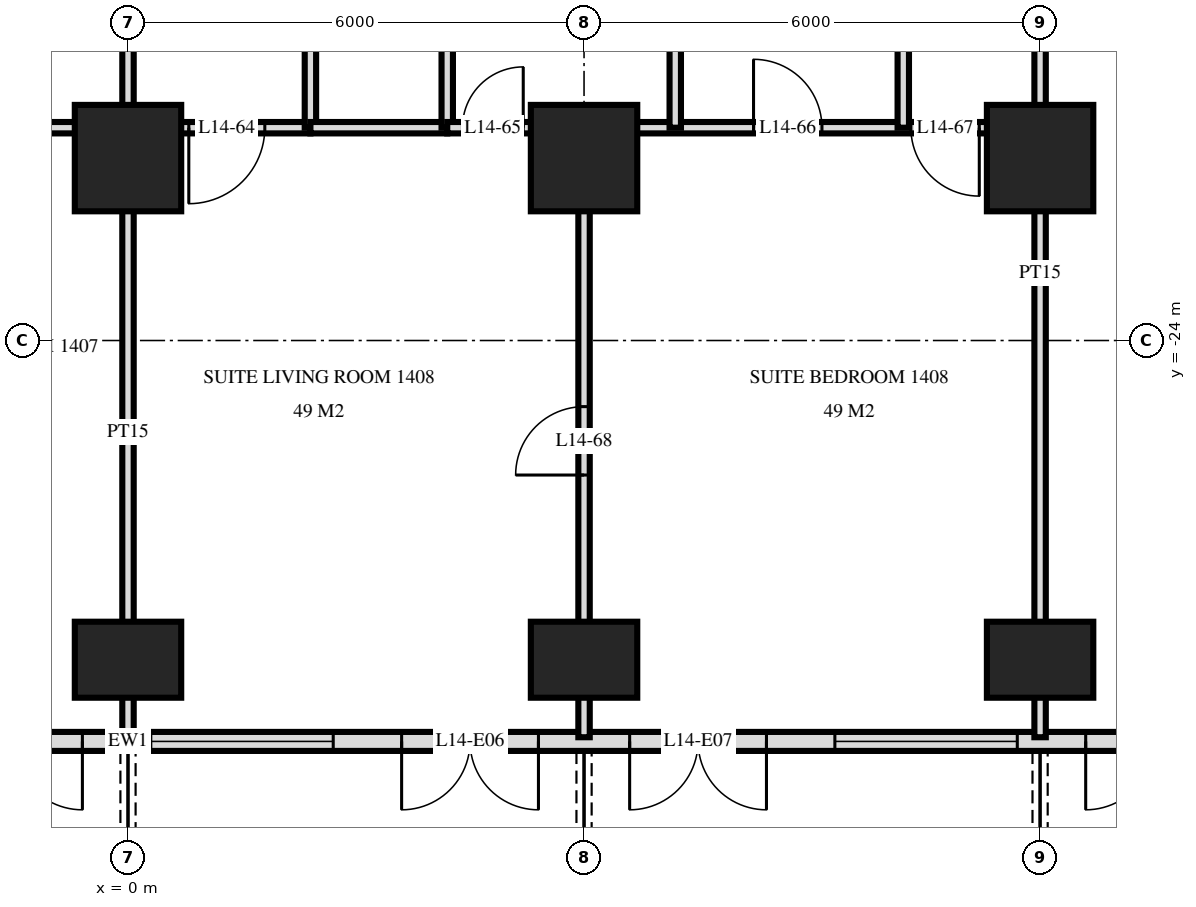
"""IFC4 building model, lengths in metres.
Left out: names, types, materials, properties, quantities, classifications, styles, units other than length and angle.
Written with IfcOpenShell. Run it as: python <this file> out.ifc"""

import sys

from ifc_helpers import new_model, si_unit, direction, frame, frame_2d, origin, origin_2d, place, context, subcontext, project, spatial, rectangle, extrude, element, fill, save


model = new_model("IFC4")
c1 = context("Model", 3, precision=1e-05, world=origin(), true_north=direction((0.0, 1.0)))
c2 = subcontext(c1, "Body", "Model", "MODEL_VIEW")
j1 = project(units=[si_unit("LENGTHUNIT", "METRE"), si_unit("PLANEANGLEUNIT", "RADIAN")], contexts=[c1])
p1 = place(None, origin())
s1 = spatial("IfcSite", under=j1, at=p1, CompositionType="ELEMENT")
p2 = place(p1, origin())
s2 = spatial("IfcBuilding", under=s1, at=p2, CompositionType="ELEMENT")
p3 = place(p2, frame((0.0, 0.0, 60.0)))
s3 = spatial("IfcBuildingStorey", under=s2, at=p3, CompositionType="ELEMENT", Elevation=60.0)
p4 = place(p3, frame((0.0, -28.2, 0.0), z_axis=(0.0, 0.0, 1.0), x_axis=(1.0, 0.0, 0.0)))
e1 = element("IfcColumn", 1, at=p4, inside=s3, PredefinedType="COLUMN", context=c2, shape_type="SweptSolid", body=[
    extrude(rectangle(XDim=1.4, YDim=1.0, at=origin_2d()), origin(), (0.0, 0.0, 1.0), 3.6),
])
p5 = place(p3, frame((0.0, -21.6, 0.0), z_axis=(0.0, 0.0, 1.0), x_axis=(1.0, 0.0, 0.0)))
e2 = element("IfcColumn", 2, at=p5, inside=s3, PredefinedType="COLUMN", context=c2, shape_type="SweptSolid", body=[
    extrude(rectangle(XDim=1.4, YDim=1.4, at=origin_2d()), origin(), (0.0, 0.0, 1.0), 3.6),
])
p6 = place(p3, frame((6.0, -28.2, 0.0), z_axis=(0.0, 0.0, 1.0), x_axis=(1.0, 0.0, 0.0)))
e3 = element("IfcColumn", 3, at=p6, inside=s3, PredefinedType="COLUMN", context=c2, shape_type="SweptSolid", body=[
    extrude(rectangle(XDim=1.4, YDim=1.0, at=origin_2d()), origin(), (0.0, 0.0, 1.0), 3.6),
])
p7 = place(p3, frame((6.0, -21.6, 0.0), z_axis=(0.0, 0.0, 1.0), x_axis=(1.0, 0.0, 0.0)))
e4 = element("IfcColumn", 4, at=p7, inside=s3, PredefinedType="COLUMN", context=c2, shape_type="SweptSolid", body=[
    extrude(rectangle(XDim=1.4, YDim=1.4, at=origin_2d()), origin(), (0.0, 0.0, 1.0), 3.6),
])
p8 = place(p3, frame((12.0, -28.2, 0.0), z_axis=(0.0, 0.0, 1.0), x_axis=(1.0, 0.0, 0.0)))
e5 = element("IfcColumn", 5, at=p8, inside=s3, PredefinedType="COLUMN", context=c2, shape_type="SweptSolid", body=[
    extrude(rectangle(XDim=1.4, YDim=1.0, at=origin_2d()), origin(), (0.0, 0.0, 1.0), 3.6),
])
p9 = place(p3, frame((12.0, -21.6, 0.0), z_axis=(0.0, 0.0, 1.0), x_axis=(1.0, 0.0, 0.0)))
e6 = element("IfcColumn", 6, at=p9, inside=s3, PredefinedType="COLUMN", context=c2, shape_type="SweptSolid", body=[
    extrude(rectangle(XDim=1.4, YDim=1.4, at=origin_2d()), origin(), (0.0, 0.0, 1.0), 3.6),
])
p10 = place(p3, frame((-28.775, -29.275, 0.0), z_axis=(0.0, 0.0, 1.0), x_axis=(1.0, 0.0, 0.0)))
e7 = element("IfcWall", 7, at=p10, inside=s3, PredefinedType="SOLIDWALL", context=c2, shape_type="SweptSolid", body=[
    extrude(rectangle(XDim=57.551, YDim=0.25, at=frame_2d((28.775, 0.0))), origin(), (0.0, 0.0, 1.0), 3.32),
])
p11 = place(p10, frame((0.575, 0.0, 0.0)))
e8 = element("IfcOpeningElement", 8, at=p11, cuts=e7, PredefinedType="OPENING", context=c2, shape_type="SweptSolid", body=[
    extrude(rectangle(XDim=1.8, YDim=2.4, at=frame_2d((0.9, 1.2))), frame((0.0, 0.135, 0.0), z_axis=(0.0, -1.0, 0.0), x_axis=(1.0, 0.0, 0.0)), (0.0, 0.0, 1.0), 0.27),
])
p12 = place(p10, frame((5.375, 0.0, 0.0)))
e9 = element("IfcOpeningElement", 9, at=p12, cuts=e7, PredefinedType="OPENING", context=c2, shape_type="SweptSolid", body=[
    extrude(rectangle(XDim=1.8, YDim=2.4, at=frame_2d((0.9, 1.2))), frame((0.0, 0.135, 0.0), z_axis=(0.0, -1.0, 0.0), x_axis=(1.0, 0.0, 0.0)), (0.0, 0.0, 1.0), 0.27),
])
p13 = place(p10, frame((8.075, 0.0, 0.3)))
e10 = element("IfcOpeningElement", 10, at=p13, cuts=e7, PredefinedType="OPENING", context=c2, shape_type="SweptSolid", body=[
    extrude(rectangle(XDim=2.4, YDim=2.1, at=frame_2d((1.2, 1.05))), frame((0.0, 0.135, 0.0), z_axis=(0.0, -1.0, 0.0), x_axis=(1.0, 0.0, 0.0)), (0.0, 0.0, 1.0), 0.27),
])
p14 = place(p10, frame((11.375, 0.0, 0.0)))
e11 = element("IfcOpeningElement", 11, at=p14, cuts=e7, PredefinedType="OPENING", context=c2, shape_type="SweptSolid", body=[
    extrude(rectangle(XDim=1.8, YDim=2.4, at=frame_2d((0.9, 1.2))), frame((0.0, 0.135, 0.0), z_axis=(0.0, -1.0, 0.0), x_axis=(1.0, 0.0, 0.0)), (0.0, 0.0, 1.0), 0.27),
])
p15 = place(p10, frame((14.075, 0.0, 0.3)))
e12 = element("IfcOpeningElement", 12, at=p15, cuts=e7, PredefinedType="OPENING", context=c2, shape_type="SweptSolid", body=[
    extrude(rectangle(XDim=2.4, YDim=2.1, at=frame_2d((1.2, 1.05))), frame((0.0, 0.135, 0.0), z_axis=(0.0, -1.0, 0.0), x_axis=(1.0, 0.0, 0.0)), (0.0, 0.0, 1.0), 0.27),
])
p16 = place(p10, frame((17.375, 0.0, 0.0)))
e13 = element("IfcOpeningElement", 13, at=p16, cuts=e7, PredefinedType="OPENING", context=c2, shape_type="SweptSolid", body=[
    extrude(rectangle(XDim=1.8, YDim=2.4, at=frame_2d((0.9, 1.2))), frame((0.0, 0.135, 0.0), z_axis=(0.0, -1.0, 0.0), x_axis=(1.0, 0.0, 0.0)), (0.0, 0.0, 1.0), 0.27),
])
p17 = place(p10, frame((20.075, 0.0, 0.3)))
e14 = element("IfcOpeningElement", 14, at=p17, cuts=e7, PredefinedType="OPENING", context=c2, shape_type="SweptSolid", body=[
    extrude(rectangle(XDim=2.4, YDim=2.1, at=frame_2d((1.2, 1.05))), frame((0.0, 0.135, 0.0), z_axis=(0.0, -1.0, 0.0), x_axis=(1.0, 0.0, 0.0)), (0.0, 0.0, 1.0), 0.27),
])
p18 = place(p10, frame((23.075, 0.0, 0.3)))
e15 = element("IfcOpeningElement", 15, at=p18, cuts=e7, PredefinedType="OPENING", context=c2, shape_type="SweptSolid", body=[
    extrude(rectangle(XDim=2.4, YDim=2.1, at=frame_2d((1.2, 1.05))), frame((0.0, 0.135, 0.0), z_axis=(0.0, -1.0, 0.0), x_axis=(1.0, 0.0, 0.0)), (0.0, 0.0, 1.0), 0.27),
])
p19 = place(p10, frame((26.375, 0.0, 0.0)))
e16 = element("IfcOpeningElement", 16, at=p19, cuts=e7, PredefinedType="OPENING", context=c2, shape_type="SweptSolid", body=[
    extrude(rectangle(XDim=1.8, YDim=2.4, at=frame_2d((0.9, 1.2))), frame((0.0, 0.135, 0.0), z_axis=(0.0, -1.0, 0.0), x_axis=(1.0, 0.0, 0.0)), (0.0, 0.0, 1.0), 0.27),
])
p20 = place(p10, frame((29.075, 0.0, 0.3)))
e17 = element("IfcOpeningElement", 17, at=p20, cuts=e7, PredefinedType="OPENING", context=c2, shape_type="SweptSolid", body=[
    extrude(rectangle(XDim=2.4, YDim=2.1, at=frame_2d((1.2, 1.05))), frame((0.0, 0.135, 0.0), z_axis=(0.0, -1.0, 0.0), x_axis=(1.0, 0.0, 0.0)), (0.0, 0.0, 1.0), 0.27),
])
p21 = place(p10, frame((32.375, 0.0, 0.0)))
e18 = element("IfcOpeningElement", 18, at=p21, cuts=e7, PredefinedType="OPENING", context=c2, shape_type="SweptSolid", body=[
    extrude(rectangle(XDim=1.8, YDim=2.4, at=frame_2d((0.9, 1.2))), frame((0.0, 0.135, 0.0), z_axis=(0.0, -1.0, 0.0), x_axis=(1.0, 0.0, 0.0)), (0.0, 0.0, 1.0), 0.27),
])
p22 = place(p10, frame((35.375, 0.0, 0.0)))
e19 = element("IfcOpeningElement", 19, at=p22, cuts=e7, PredefinedType="OPENING", context=c2, shape_type="SweptSolid", body=[
    extrude(rectangle(XDim=1.8, YDim=2.4, at=frame_2d((0.9, 1.2))), frame((0.0, 0.135, 0.0), z_axis=(0.0, -1.0, 0.0), x_axis=(1.0, 0.0, 0.0)), (0.0, 0.0, 1.0), 0.27),
])
p23 = place(p10, frame((38.075, 0.0, 0.3)))
e20 = element("IfcOpeningElement", 20, at=p23, cuts=e7, PredefinedType="OPENING", context=c2, shape_type="SweptSolid", body=[
    extrude(rectangle(XDim=2.4, YDim=2.1, at=frame_2d((1.2, 1.05))), frame((0.0, 0.135, 0.0), z_axis=(0.0, -1.0, 0.0), x_axis=(1.0, 0.0, 0.0)), (0.0, 0.0, 1.0), 0.27),
])
p24 = place(p10, frame((41.375, 0.0, 0.0)))
e21 = element("IfcOpeningElement", 21, at=p24, cuts=e7, PredefinedType="OPENING", context=c2, shape_type="SweptSolid", body=[
    extrude(rectangle(XDim=1.8, YDim=2.4, at=frame_2d((0.9, 1.2))), frame((0.0, 0.135, 0.0), z_axis=(0.0, -1.0, 0.0), x_axis=(1.0, 0.0, 0.0)), (0.0, 0.0, 1.0), 0.27),
])
p25 = place(p10, frame((44.075, 0.0, 0.3)))
e22 = element("IfcOpeningElement", 22, at=p25, cuts=e7, PredefinedType="OPENING", context=c2, shape_type="SweptSolid", body=[
    extrude(rectangle(XDim=2.4, YDim=2.1, at=frame_2d((1.2, 1.05))), frame((0.0, 0.135, 0.0), z_axis=(0.0, -1.0, 0.0), x_axis=(1.0, 0.0, 0.0)), (0.0, 0.0, 1.0), 0.27),
])
p26 = place(p10, frame((47.075, 0.0, 0.3)))
e23 = element("IfcOpeningElement", 23, at=p26, cuts=e7, PredefinedType="OPENING", context=c2, shape_type="SweptSolid", body=[
    extrude(rectangle(XDim=2.4, YDim=2.1, at=frame_2d((1.2, 1.05))), frame((0.0, 0.135, 0.0), z_axis=(0.0, -1.0, 0.0), x_axis=(1.0, 0.0, 0.0)), (0.0, 0.0, 1.0), 0.27),
])
p27 = place(p10, frame((50.375, 0.0, 0.0)))
e24 = element("IfcOpeningElement", 24, at=p27, cuts=e7, PredefinedType="OPENING", context=c2, shape_type="SweptSolid", body=[
    extrude(rectangle(XDim=1.8, YDim=2.4, at=frame_2d((0.9, 1.2))), frame((0.0, 0.135, 0.0), z_axis=(0.0, -1.0, 0.0), x_axis=(1.0, 0.0, 0.0)), (0.0, 0.0, 1.0), 0.27),
])
p28 = place(p10, frame((53.375, 0.0, 0.0)))
e25 = element("IfcOpeningElement", 25, at=p28, cuts=e7, PredefinedType="OPENING", context=c2, shape_type="SweptSolid", body=[
    extrude(rectangle(XDim=1.8, YDim=2.4, at=frame_2d((0.9, 1.2))), frame((0.0, 0.135, 0.0), z_axis=(0.0, -1.0, 0.0), x_axis=(1.0, 0.0, 0.0)), (0.0, 0.0, 1.0), 0.27),
])
p29 = place(p3, frame((12.0, -29.22, 0.0), z_axis=(0.0, 0.0, 1.0), x_axis=(0.0, 1.0, 0.0)))
e26 = element("IfcWall", 26, at=p29, inside=s3, PredefinedType="PARTITIONING", context=c2, shape_type="SweptSolid", body=[
    extrude(rectangle(XDim=12.22, YDim=0.15, at=frame_2d((6.11, 0.0))), origin(), (0.0, 0.0, 1.0), 3.32),
])
for number, where, z_axis, x_axis in (
    (27, (10.2, -21.2, 0.0), (0.0, 0.0, 1.0), (0.0, 1.0, 0.0)),
    (28, (7.2, -21.2, 0.0), (0.0, 0.0, 1.0), (0.0, 1.0, 0.0)),
):
    element("IfcWall", number, at=place(p3, frame(where, z_axis=z_axis, x_axis=x_axis)), inside=s3, PredefinedType="PARTITIONING", context=c2, shape_type="SweptSolid", body=[
        extrude(rectangle(XDim=4.2, YDim=0.15, at=frame_2d((2.1, 0.0))), origin(), (0.0, 0.0, 1.0), 3.32),
    ])
p30 = place(p3, frame((6.0, -29.22, 0.0), z_axis=(0.0, 0.0, 1.0), x_axis=(0.0, 1.0, 0.0)))
e29 = element("IfcWall", 29, at=p30, inside=s3, PredefinedType="PARTITIONING", context=c2, shape_type="SweptSolid", body=[
    extrude(rectangle(XDim=8.02, YDim=0.15, at=frame_2d((4.01, 0.0))), origin(), (0.0, 0.0, 1.0), 3.32),
])
p31 = place(p30, frame((3.45, 0.0, 0.0)))
e30 = element("IfcOpeningElement", 30, at=p31, cuts=e29, PredefinedType="OPENING", context=c2, shape_type="SweptSolid", body=[
    extrude(rectangle(XDim=0.9, YDim=2.1, at=frame_2d((0.45, 1.05))), frame((0.0, 0.085, 0.0), z_axis=(0.0, -1.0, 0.0), x_axis=(1.0, 0.0, 0.0)), (0.0, 0.0, 1.0), 0.17),
])
p32 = place(p3, frame((4.2, -21.2, 0.0), z_axis=(0.0, 0.0, 1.0), x_axis=(0.0, 1.0, 0.0)))
e31 = element("IfcWall", 31, at=p32, inside=s3, PredefinedType="PLUMBINGWALL", context=c2, shape_type="SweptSolid", body=[
    extrude(rectangle(XDim=4.2, YDim=0.15, at=frame_2d((2.1, 0.0))), origin(), (0.0, 0.0, 1.0), 3.32),
])
p33 = place(p3, frame((2.4, -21.2, 0.0), z_axis=(0.0, 0.0, 1.0), x_axis=(0.0, 1.0, 0.0)))
e32 = element("IfcWall", 32, at=p33, inside=s3, PredefinedType="PARTITIONING", context=c2, shape_type="SweptSolid", body=[
    extrude(rectangle(XDim=4.2, YDim=0.15, at=frame_2d((2.1, 0.0))), origin(), (0.0, 0.0, 1.0), 3.32),
])
p34 = place(p33, frame((1.6, 0.0, 0.0)))
e33 = element("IfcOpeningElement", 33, at=p34, cuts=e32, PredefinedType="OPENING", context=c2, shape_type="SweptSolid", body=[
    extrude(rectangle(XDim=1.0, YDim=2.1, at=frame_2d((0.5, 1.05))), frame((0.0, 0.085, 0.0), z_axis=(0.0, -1.0, 0.0), x_axis=(1.0, 0.0, 0.0)), (0.0, 0.0, 1.0), 0.17),
])
p35 = place(p3, frame((0.0, -21.2, 0.0), z_axis=(0.0, 0.0, 1.0), x_axis=(0.0, 1.0, 0.0)))
e34 = element("IfcWall", 34, at=p35, inside=s3, PredefinedType="PARTITIONING", context=c2, shape_type="SweptSolid", body=[
    extrude(rectangle(XDim=4.2, YDim=0.15, at=frame_2d((2.1, 0.0))), origin(), (0.0, 0.0, 1.0), 3.32),
])
p36 = place(p3, frame((0.0, -29.22, 0.0), z_axis=(0.0, 0.0, 1.0), x_axis=(0.0, 1.0, 0.0)))
e35 = element("IfcWall", 35, at=p36, inside=s3, PredefinedType="PARTITIONING", context=c2, shape_type="SweptSolid", body=[
    extrude(rectangle(XDim=8.02, YDim=0.15, at=frame_2d((4.01, 0.0))), origin(), (0.0, 0.0, 1.0), 3.32),
])
p37 = place(p3, frame((0.0, -21.2, 0.0), z_axis=(0.0, 0.0, 1.0), x_axis=(1.0, 0.0, 0.0)))
e36 = element("IfcWall", 36, at=p37, inside=s3, PredefinedType="PARTITIONING", context=c2, shape_type="SweptSolid", body=[
    extrude(rectangle(XDim=2.4, YDim=0.15, at=frame_2d((1.2, 0.0))), origin(), (0.0, 0.0, 1.0), 3.32),
])
p38 = place(p37, frame((0.8, 0.0, 0.0)))
e37 = element("IfcOpeningElement", 37, at=p38, cuts=e36, PredefinedType="OPENING", context=c2, shape_type="SweptSolid", body=[
    extrude(rectangle(XDim=1.0, YDim=2.1, at=frame_2d((0.5, 1.05))), frame((0.0, 0.085, 0.0), z_axis=(0.0, -1.0, 0.0), x_axis=(1.0, 0.0, 0.0)), (0.0, 0.0, 1.0), 0.17),
])
p39 = place(p3, frame((-1.7, -21.2, 0.0), z_axis=(0.0, 0.0, 1.0), x_axis=(1.0, 0.0, 0.0)))
e38 = element("IfcWall", 38, at=p39, inside=s3, PredefinedType="PARTITIONING", context=c2, shape_type="SweptSolid", body=[
    extrude(rectangle(XDim=1.7, YDim=0.15, at=frame_2d((0.85, 0.0))), origin(), (0.0, 0.0, 1.0), 3.32),
])
p40 = place(p3, frame((4.2, -21.2, 0.0), z_axis=(0.0, 0.0, 1.0), x_axis=(1.0, 0.0, 0.0)))
e39 = element("IfcWall", 39, at=p40, inside=s3, PredefinedType="PARTITIONING", context=c2, shape_type="SweptSolid", body=[
    extrude(rectangle(XDim=7.8, YDim=0.15, at=frame_2d((3.9, 0.0))), origin(), (0.0, 0.0, 1.0), 3.32),
])
p41 = place(p40, frame((0.2, 0.0, 0.0)))
e40 = element("IfcOpeningElement", 40, at=p41, cuts=e39, PredefinedType="OPENING", context=c2, shape_type="SweptSolid", body=[
    extrude(rectangle(XDim=0.8, YDim=2.1, at=frame_2d((0.4, 1.05))), frame((0.0, 0.085, 0.0), z_axis=(0.0, -1.0, 0.0), x_axis=(1.0, 0.0, 0.0)), (0.0, 0.0, 1.0), 0.17),
])
p42 = place(p40, frame((4.03, 0.0, 0.0)))
e41 = element("IfcOpeningElement", 41, at=p42, cuts=e39, PredefinedType="OPENING", context=c2, shape_type="SweptSolid", body=[
    extrude(rectangle(XDim=0.9, YDim=2.1, at=frame_2d((0.45, 1.05))), frame((0.0, 0.085, 0.0), z_axis=(0.0, -1.0, 0.0), x_axis=(1.0, 0.0, 0.0)), (0.0, 0.0, 1.0), 0.17),
])
p43 = place(p40, frame((6.1, 0.0, 0.0)))
e42 = element("IfcOpeningElement", 42, at=p43, cuts=e39, PredefinedType="OPENING", context=c2, shape_type="SweptSolid", body=[
    extrude(rectangle(XDim=0.9, YDim=2.1, at=frame_2d((0.45, 1.05))), frame((0.0, 0.085, 0.0), z_axis=(0.0, -1.0, 0.0), x_axis=(1.0, 0.0, 0.0)), (0.0, 0.0, 1.0), 0.17),
])
p44 = place(p3, frame((2.4, -21.2, 0.0), z_axis=(0.0, 0.0, 1.0), x_axis=(1.0, 0.0, 0.0)))
e43 = element("IfcWall", 43, at=p44, inside=s3, PredefinedType="PLUMBINGWALL", context=c2, shape_type="SweptSolid", body=[
    extrude(rectangle(XDim=1.8, YDim=0.15, at=frame_2d((0.9, 0.0))), origin(), (0.0, 0.0, 1.0), 3.32),
])
p45 = place(p19, frame((0.9, 0.0, 0.0), z_axis=(0.0, 0.0, 1.0), x_axis=(-1.0, 0.0, 0.0)))
e44 = element("IfcDoor", 44, at=p45, inside=s3, OperationType="DOUBLE_DOOR_SINGLE_SWING", PredefinedType="DOOR", context=c2, shape_type="SweptSolid", body=[
    extrude(rectangle(XDim=1.8, YDim=2.4, at=frame_2d((0.0, 1.2))), frame((0.0, -0.025, 0.0), z_axis=(0.0, 1.0, 0.0), x_axis=(-1.0, 0.0, 0.0)), (0.0, 0.0, 1.0), 0.05),
])
fill(e16, e44)
p46 = place(p20, origin())
e45 = element("IfcWindow", 45, at=p46, inside=s3, PartitioningType="SINGLE_PANEL", PredefinedType="WINDOW", context=c2, shape_type="SweptSolid", body=[
    extrude(rectangle(XDim=2.4, YDim=2.1, at=frame_2d((1.2, 1.05))), frame((0.0, 0.03, 0.0), z_axis=(0.0, -1.0, 0.0), x_axis=(1.0, 0.0, 0.0)), (0.0, 0.0, 1.0), 0.06),
])
fill(e17, e45)
p47 = place(p21, frame((0.9, 0.0, 0.0), z_axis=(0.0, 0.0, 1.0), x_axis=(-1.0, 0.0, 0.0)))
e46 = element("IfcDoor", 46, at=p47, inside=s3, OperationType="DOUBLE_DOOR_SINGLE_SWING", PredefinedType="DOOR", context=c2, shape_type="SweptSolid", body=[
    extrude(rectangle(XDim=1.8, YDim=2.4, at=frame_2d((0.0, 1.2))), frame((0.0, -0.025, 0.0), z_axis=(0.0, 1.0, 0.0), x_axis=(-1.0, 0.0, 0.0)), (0.0, 0.0, 1.0), 0.05),
])
fill(e18, e46)
p48 = place(p22, frame((0.9, 0.0, 0.0), z_axis=(0.0, 0.0, 1.0), x_axis=(-1.0, 0.0, 0.0)))
e47 = element("IfcDoor", 47, at=p48, inside=s3, OperationType="DOUBLE_DOOR_SINGLE_SWING", PredefinedType="DOOR", context=c2, shape_type="SweptSolid", body=[
    extrude(rectangle(XDim=1.8, YDim=2.4, at=frame_2d((0.0, 1.2))), frame((0.0, -0.025, 0.0), z_axis=(0.0, 1.0, 0.0), x_axis=(-1.0, 0.0, 0.0)), (0.0, 0.0, 1.0), 0.05),
])
fill(e19, e47)
p49 = place(p23, origin())
e48 = element("IfcWindow", 48, at=p49, inside=s3, PartitioningType="SINGLE_PANEL", PredefinedType="WINDOW", context=c2, shape_type="SweptSolid", body=[
    extrude(rectangle(XDim=2.4, YDim=2.1, at=frame_2d((1.2, 1.05))), frame((0.0, 0.03, 0.0), z_axis=(0.0, -1.0, 0.0), x_axis=(1.0, 0.0, 0.0)), (0.0, 0.0, 1.0), 0.06),
])
fill(e20, e48)
p50 = place(p24, frame((0.9, 0.0, 0.0), z_axis=(0.0, 0.0, 1.0), x_axis=(-1.0, 0.0, 0.0)))
e49 = element("IfcDoor", 49, at=p50, inside=s3, OperationType="DOUBLE_DOOR_SINGLE_SWING", PredefinedType="DOOR", context=c2, shape_type="SweptSolid", body=[
    extrude(rectangle(XDim=1.8, YDim=2.4, at=frame_2d((0.0, 1.2))), frame((0.0, -0.025, 0.0), z_axis=(0.0, 1.0, 0.0), x_axis=(-1.0, 0.0, 0.0)), (0.0, 0.0, 1.0), 0.05),
])
fill(e21, e49)
p51 = place(p38, frame((0.5, 0.0, 0.0), z_axis=(0.0, 0.0, 1.0), x_axis=(-1.0, 0.0, 0.0)))
e50 = element("IfcDoor", 50, at=p51, inside=s3, OperationType="SINGLE_SWING_LEFT", PredefinedType="DOOR", context=c2, shape_type="SweptSolid", body=[
    extrude(rectangle(XDim=1.0, YDim=2.1, at=frame_2d((0.0, 1.05))), frame((0.0, -0.025, 0.0), z_axis=(0.0, 1.0, 0.0), x_axis=(-1.0, 0.0, 0.0)), (0.0, 0.0, 1.0), 0.05),
])
fill(e37, e50)
p52 = place(p41, origin())
e51 = element("IfcDoor", 51, at=p52, inside=s3, OperationType="SINGLE_SWING_LEFT", PredefinedType="DOOR", context=c2, shape_type="SweptSolid", body=[
    extrude(rectangle(XDim=0.8, YDim=2.1, at=frame_2d((0.4, 1.05))), frame((0.0, 0.025, 0.0), z_axis=(0.0, -1.0, 0.0), x_axis=(1.0, 0.0, 0.0)), (0.0, 0.0, 1.0), 0.05),
])
fill(e40, e51)
p53 = place(p42, origin())
e52 = element("IfcDoor", 52, at=p53, inside=s3, OperationType="SINGLE_SWING_RIGHT", PredefinedType="DOOR", context=c2, shape_type="SweptSolid", body=[
    extrude(rectangle(XDim=0.9, YDim=2.1, at=frame_2d((0.45, 1.05))), frame((0.0, 0.025, 0.0), z_axis=(0.0, -1.0, 0.0), x_axis=(1.0, 0.0, 0.0)), (0.0, 0.0, 1.0), 0.05),
])
fill(e41, e52)
p54 = place(p43, frame((0.45, 0.0, 0.0), z_axis=(0.0, 0.0, 1.0), x_axis=(-1.0, 0.0, 0.0)))
e53 = element("IfcDoor", 53, at=p54, inside=s3, OperationType="SINGLE_SWING_RIGHT", PredefinedType="DOOR", context=c2, shape_type="SweptSolid", body=[
    extrude(rectangle(XDim=0.9, YDim=2.1, at=frame_2d((0.0, 1.05))), frame((0.0, -0.025, 0.0), z_axis=(0.0, 1.0, 0.0), x_axis=(-1.0, 0.0, 0.0)), (0.0, 0.0, 1.0), 0.05),
])
fill(e42, e53)
p55 = place(p31, origin())
e54 = element("IfcDoor", 54, at=p55, inside=s3, OperationType="SINGLE_SWING_RIGHT", PredefinedType="DOOR", context=c2, shape_type="SweptSolid", body=[
    extrude(rectangle(XDim=0.9, YDim=2.1, at=frame_2d((0.45, 1.05))), frame((0.0, 0.025, 0.0), z_axis=(0.0, -1.0, 0.0), x_axis=(1.0, 0.0, 0.0)), (0.0, 0.0, 1.0), 0.05),
])
fill(e30, e54)
save(model, sys.argv[1])
